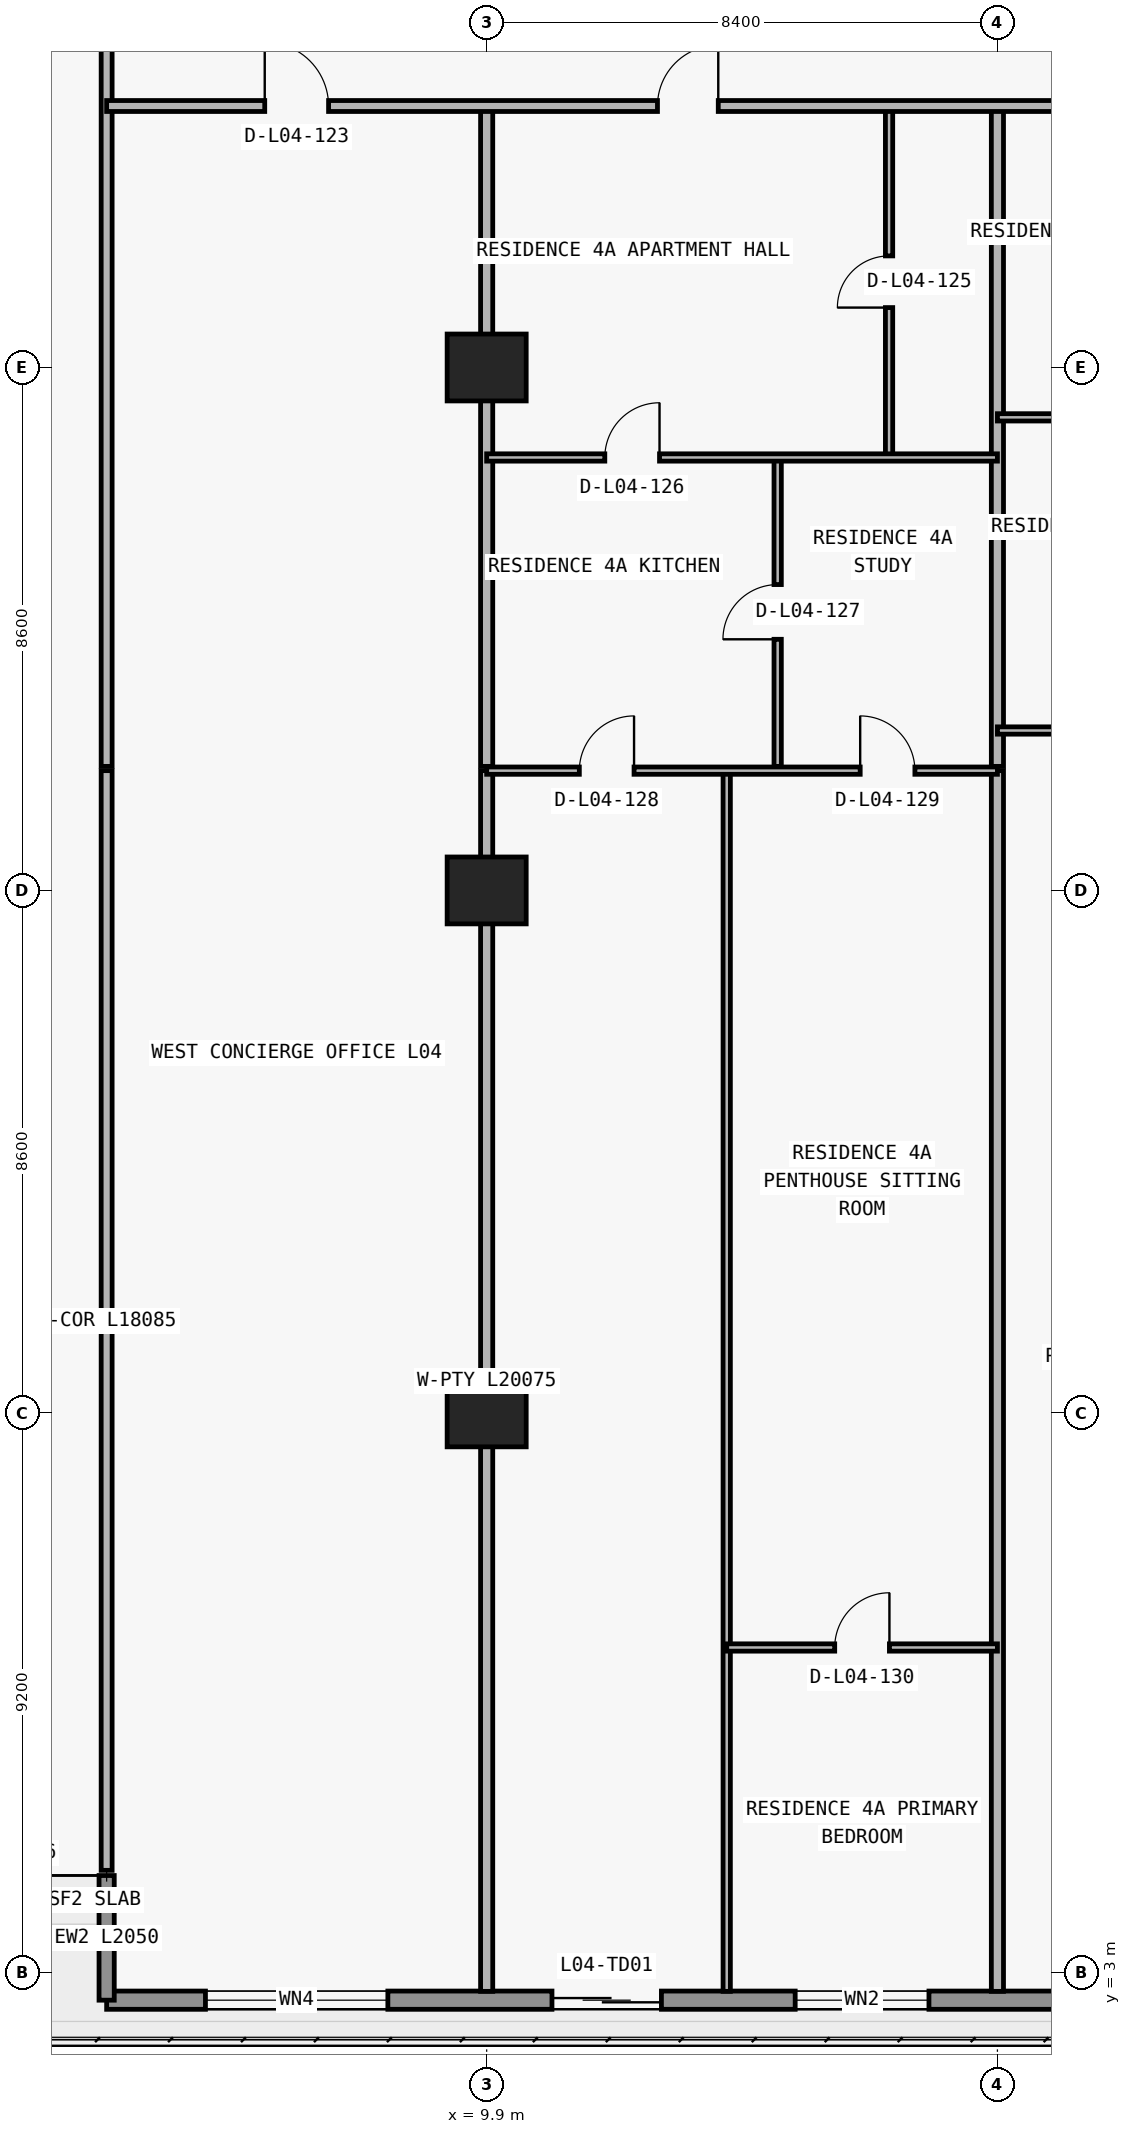
"""IFC4 building model, lengths in metres.
Left out: names, types, materials, properties, quantities, classifications, styles, units other than length and angle.
Written with IfcOpenShell. Run it as: python <this file> out.ifc"""

import sys

from ifc_helpers import new_model, si_unit, direction, frame, frame_2d, origin, origin_2d, place, context, subcontext, project, spatial, rectangle, extrude, element, fill, save


model = new_model("IFC4")
c1 = context("Model", 3, precision=1e-05, world=origin(), true_north=direction((0.0, 1.0)))
c2 = subcontext(c1, "Body", "Model", "MODEL_VIEW")
j1 = project(units=[si_unit("LENGTHUNIT", "METRE"), si_unit("PLANEANGLEUNIT", "RADIAN")], contexts=[c1])
p1 = place(None, origin())
s1 = spatial("IfcSite", under=j1, at=p1, CompositionType="ELEMENT")
p2 = place(p1, origin())
s2 = spatial("IfcBuilding", under=s1, at=p2, CompositionType="ELEMENT")
p3 = place(p2, frame((0.0, 0.0, 19.8)))
s3 = spatial("IfcBuildingStorey", under=s2, at=p3, CompositionType="ELEMENT", Elevation=19.8)
for number, where, z_axis, x_axis in (
    (1, (9.9, 12.2, 0.0), (0.0, 0.0, 1.0), (1.0, 0.0, 0.0)),
    (2, (9.9, 20.8, 0.0), (0.0, 0.0, 1.0), (1.0, 0.0, 0.0)),
    (3, (9.9, 29.4, 0.0), (0.0, 0.0, 1.0), (1.0, 0.0, 0.0)),
):
    element("IfcColumn", number, at=place(p3, frame(where, z_axis=z_axis, x_axis=x_axis)), inside=s3, PredefinedType="COLUMN", context=c2, shape_type="SweptSolid", body=[
        extrude(rectangle(XDim=1.3, YDim=1.1, at=origin_2d()), origin(), (0.0, 0.0, 1.0), 4.45),
    ])
p4 = place(p3, frame((74.15, 2.55, 0.0), z_axis=(0.0, 0.0, 1.0), x_axis=(-1.0, 0.0, 0.0)))
e4 = element("IfcWall", 4, at=p4, inside=s3, PredefinedType="STANDARD", context=c2, shape_type="SweptSolid", body=[
    extrude(rectangle(XDim=70.5, YDim=0.3, at=frame_2d((35.25, 0.0))), origin(), (0.0, 0.0, 1.0), 4.45),
])
p5 = place(p4, frame((65.875, 0.0, 0.85)))
e5 = element("IfcOpeningElement", 5, at=p5, cuts=e4, PredefinedType="OPENING", context=c2, shape_type="SweptSolid", body=[
    extrude(rectangle(XDim=3.0, YDim=2.4, at=frame_2d((1.5, 1.2))), frame((0.0, 0.16, 0.0), z_axis=(0.0, -1.0, 0.0), x_axis=(1.0, 0.0, 0.0)), (0.0, 0.0, 1.0), 0.32),
])
p6 = place(p4, frame((61.376, 0.0, 0.0)))
e6 = element("IfcOpeningElement", 6, at=p6, cuts=e4, PredefinedType="OPENING", context=c2, shape_type="SweptSolid", body=[
    extrude(rectangle(XDim=1.8, YDim=2.3, at=frame_2d((0.9, 1.15))), frame((0.0, 0.16, 0.0), z_axis=(0.0, -1.0, 0.0), x_axis=(1.0, 0.0, 0.0)), (0.0, 0.0, 1.0), 0.32),
])
p7 = place(p4, frame((56.976, 0.0, 0.85)))
e7 = element("IfcOpeningElement", 7, at=p7, cuts=e4, PredefinedType="OPENING", context=c2, shape_type="SweptSolid", body=[
    extrude(rectangle(XDim=2.2, YDim=1.55, at=frame_2d((1.1, 0.775))), frame((0.0, 0.16, 0.0), z_axis=(0.0, -1.0, 0.0), x_axis=(1.0, 0.0, 0.0)), (0.0, 0.0, 1.0), 0.32),
])
p8 = place(p4, frame((52.64, 0.0, 0.0)))
e8 = element("IfcOpeningElement", 8, at=p8, cuts=e4, PredefinedType="OPENING", context=c2, shape_type="SweptSolid", body=[
    extrude(rectangle(XDim=1.8, YDim=2.3, at=frame_2d((0.9, 1.15))), frame((0.0, 0.16, 0.0), z_axis=(0.0, -1.0, 0.0), x_axis=(1.0, 0.0, 0.0)), (0.0, 0.0, 1.0), 0.32),
])
p9 = place(p4, frame((48.24, 0.0, 0.85)))
e9 = element("IfcOpeningElement", 9, at=p9, cuts=e4, PredefinedType="OPENING", context=c2, shape_type="SweptSolid", body=[
    extrude(rectangle(XDim=2.2, YDim=1.55, at=frame_2d((1.1, 0.775))), frame((0.0, 0.16, 0.0), z_axis=(0.0, -1.0, 0.0), x_axis=(1.0, 0.0, 0.0)), (0.0, 0.0, 1.0), 0.32),
])
p10 = place(p4, frame((34.35, 0.0, 0.0)))
e10 = element("IfcOpeningElement", 10, at=p10, cuts=e4, PredefinedType="OPENING", context=c2, shape_type="SweptSolid", body=[
    extrude(rectangle(XDim=1.8, YDim=2.3, at=frame_2d((0.9, 1.15))), frame((0.0, 0.16, 0.0), z_axis=(0.0, -1.0, 0.0), x_axis=(1.0, 0.0, 0.0)), (0.0, 0.0, 1.0), 0.32),
])
p11 = place(p4, frame((17.95, 0.0, 0.0)))
e11 = element("IfcOpeningElement", 11, at=p11, cuts=e4, PredefinedType="OPENING", context=c2, shape_type="SweptSolid", body=[
    extrude(rectangle(XDim=1.8, YDim=2.3, at=frame_2d((0.9, 1.15))), frame((0.0, 0.16, 0.0), z_axis=(0.0, -1.0, 0.0), x_axis=(1.0, 0.0, 0.0)), (0.0, 0.0, 1.0), 0.32),
])
p12 = place(p4, frame((9.35, 0.0, 0.85)))
e12 = element("IfcOpeningElement", 12, at=p12, cuts=e4, PredefinedType="OPENING", context=c2, shape_type="SweptSolid", body=[
    extrude(rectangle(XDim=2.2, YDim=1.55, at=frame_2d((1.1, 0.775))), frame((0.0, 0.16, 0.0), z_axis=(0.0, -1.0, 0.0), x_axis=(1.0, 0.0, 0.0)), (0.0, 0.0, 1.0), 0.32),
])
p13 = place(p4, frame((1.625, 0.0, 0.85)))
e13 = element("IfcOpeningElement", 13, at=p13, cuts=e4, PredefinedType="OPENING", context=c2, shape_type="SweptSolid", body=[
    extrude(rectangle(XDim=3.0, YDim=2.4, at=frame_2d((1.5, 1.2))), frame((0.0, 0.16, 0.0), z_axis=(0.0, -1.0, 0.0), x_axis=(1.0, 0.0, 0.0)), (0.0, 0.0, 1.0), 0.32),
])
p14 = place(p3, frame((3.65, 4.6, 0.0), z_axis=(0.0, 0.0, 1.0), x_axis=(0.0, -1.0, 0.0)))
e14 = element("IfcWall", 14, at=p14, inside=s3, PredefinedType="ELEMENTEDWALL", context=c2, shape_type="SweptSolid", body=[
    extrude(rectangle(XDim=2.05, YDim=0.25, at=frame_2d((1.025, 0.0))), origin(), (0.0, 0.0, 1.0), 4.45),
])
p15 = place(p3, frame((3.65, 4.685, 0.0), z_axis=(0.0, 0.0, 1.0), x_axis=(0.0, 1.0, 0.0)))
e15 = element("IfcWall", 15, at=p15, inside=s3, PredefinedType="PARTITIONING", context=c2, shape_type="SweptSolid", body=[
    extrude(rectangle(XDim=18.085, YDim=0.18, at=frame_2d((9.042, 0.0))), origin(), (0.0, 0.0, 1.0), 4.45),
])
p16 = place(p3, frame((3.65, 22.84, 0.0), z_axis=(0.0, 0.0, 1.0), x_axis=(0.0, 1.0, 0.0)))
e16 = element("IfcWall", 16, at=p16, inside=s3, PredefinedType="PARTITIONING", context=c2, shape_type="SweptSolid", body=[
    extrude(rectangle(XDim=25.44, YDim=0.18, at=frame_2d((12.72, 0.0))), origin(), (0.0, 0.0, 1.0), 4.45),
])
p17 = place(p3, frame((9.9, 2.695, 0.0), z_axis=(0.0, 0.0, 1.0), x_axis=(0.0, 1.0, 0.0)))
e17 = element("IfcWall", 17, at=p17, inside=s3, PredefinedType="PARTITIONING", context=c2, shape_type="SweptSolid", body=[
    extrude(rectangle(XDim=20.075, YDim=0.2, at=frame_2d((10.038, 0.0))), origin(), (0.0, 0.0, 1.0), 3.014),
])
p18 = place(p3, frame((9.9, 22.84, 0.0), z_axis=(0.0, 0.0, 1.0), x_axis=(0.0, 1.0, 0.0)))
e18 = element("IfcWall", 18, at=p18, inside=s3, PredefinedType="PARTITIONING", context=c2, shape_type="SweptSolid", body=[
    extrude(rectangle(XDim=10.86, YDim=0.2, at=frame_2d((5.43, 0.0))), origin(), (0.0, 0.0, 1.0), 3.414),
])
p19 = place(p3, frame((13.848, 2.695, 0.0), z_axis=(0.0, 0.0, 1.0), x_axis=(0.0, 1.0, 0.0)))
e19 = element("IfcWall", 19, at=p19, inside=s3, PredefinedType="PARTITIONING", context=c2, shape_type="SweptSolid", body=[
    extrude(rectangle(XDim=20.075, YDim=0.12, at=frame_2d((10.038, 0.0))), origin(), (0.0, 0.0, 1.0), 4.05),
])
p20 = place(p3, frame((14.686, 22.84, 0.0), z_axis=(0.0, 0.0, 1.0), x_axis=(0.0, 1.0, 0.0)))
e20 = element("IfcWall", 20, at=p20, inside=s3, PredefinedType="PARTITIONING", context=c2, shape_type="SweptSolid", body=[
    extrude(rectangle(XDim=5.08, YDim=0.12, at=frame_2d((2.54, 0.0))), origin(), (0.0, 0.0, 1.0), 4.45),
])
p21 = place(p20, frame((2.09, 0.0, 0.0)))
e21 = element("IfcOpeningElement", 21, at=p21, cuts=e20, PredefinedType="OPENING", context=c2, shape_type="SweptSolid", body=[
    extrude(rectangle(XDim=0.9, YDim=2.15, at=frame_2d((0.45, 1.075))), frame((0.0, 0.07, 0.0), z_axis=(0.0, -1.0, 0.0), x_axis=(1.0, 0.0, 0.0)), (0.0, 0.0, 1.0), 0.14),
])
p22 = place(p3, frame((16.518, 27.92, 0.0), z_axis=(0.0, 0.0, 1.0), x_axis=(0.0, 1.0, 0.0)))
e22 = element("IfcWall", 22, at=p22, inside=s3, PredefinedType="PARTITIONING", context=c2, shape_type="SweptSolid", body=[
    extrude(rectangle(XDim=5.78, YDim=0.12, at=frame_2d((2.89, 0.0))), origin(), (0.0, 0.0, 1.0), 3.823),
])
p23 = place(p22, frame((2.465, 0.0, 0.0)))
e23 = element("IfcOpeningElement", 23, at=p23, cuts=e22, PredefinedType="OPENING", context=c2, shape_type="SweptSolid", body=[
    extrude(rectangle(XDim=0.85, YDim=2.1, at=frame_2d((0.425, 1.05))), frame((0.0, 0.07, 0.0), z_axis=(0.0, -1.0, 0.0), x_axis=(1.0, 0.0, 0.0)), (0.0, 0.0, 1.0), 0.14),
])
p24 = place(p3, frame((18.3, 2.695, 0.0), z_axis=(0.0, 0.0, 1.0), x_axis=(0.0, 1.0, 0.0)))
e24 = element("IfcWall", 24, at=p24, inside=s3, PredefinedType="PARTITIONING", context=c2, shape_type="SweptSolid", body=[
    extrude(rectangle(XDim=20.075, YDim=0.2, at=frame_2d((10.038, 0.0))), origin(), (0.0, 0.0, 1.0), 4.05),
])
p25 = place(p3, frame((18.3, 22.84, 0.0), z_axis=(0.0, 0.0, 1.0), x_axis=(0.0, 1.0, 0.0)))
e25 = element("IfcWall", 25, at=p25, inside=s3, PredefinedType="PARTITIONING", context=c2, shape_type="SweptSolid", body=[
    extrude(rectangle(XDim=10.86, YDim=0.2, at=frame_2d((5.43, 0.0))), origin(), (0.0, 0.0, 1.0), 4.45),
])
p26 = place(p3, frame((13.848, 8.35, 0.0), z_axis=(0.0, 0.0, 1.0), x_axis=(1.0, 0.0, 0.0)))
e26 = element("IfcWall", 26, at=p26, inside=s3, PredefinedType="PARTITIONING", context=c2, shape_type="SweptSolid", body=[
    extrude(rectangle(XDim=4.452, YDim=0.12, at=frame_2d((2.226, 0.0))), origin(), (0.0, 0.0, 1.0), 4.45),
])
p27 = place(p26, frame((1.776, 0.0, 0.0)))
e27 = element("IfcOpeningElement", 27, at=p27, cuts=e26, PredefinedType="OPENING", context=c2, shape_type="SweptSolid", body=[
    extrude(rectangle(XDim=0.9, YDim=2.15, at=frame_2d((0.45, 1.075))), frame((0.0, 0.07, 0.0), z_axis=(0.0, -1.0, 0.0), x_axis=(1.0, 0.0, 0.0)), (0.0, 0.0, 1.0), 0.14),
])
p28 = place(p3, frame((9.9, 22.77, 0.0), z_axis=(0.0, 0.0, 1.0), x_axis=(1.0, 0.0, 0.0)))
e28 = element("IfcWall", 28, at=p28, inside=s3, PredefinedType="PARTITIONING", context=c2, shape_type="SweptSolid", body=[
    extrude(rectangle(XDim=8.4, YDim=0.12, at=frame_2d((4.2, 0.0))), origin(), (0.0, 0.0, 1.0), 4.45),
])
p29 = place(p28, frame((1.524, 0.0, 0.0)))
e29 = element("IfcOpeningElement", 29, at=p29, cuts=e28, PredefinedType="OPENING", context=c2, shape_type="SweptSolid", body=[
    extrude(rectangle(XDim=0.9, YDim=2.15, at=frame_2d((0.45, 1.075))), frame((0.0, 0.07, 0.0), z_axis=(0.0, -1.0, 0.0), x_axis=(1.0, 0.0, 0.0)), (0.0, 0.0, 1.0), 0.14),
])
p30 = place(p28, frame((6.143, 0.0, 0.0)))
e30 = element("IfcOpeningElement", 30, at=p30, cuts=e28, PredefinedType="OPENING", context=c2, shape_type="SweptSolid", body=[
    extrude(rectangle(XDim=0.9, YDim=2.15, at=frame_2d((0.45, 1.075))), frame((0.0, 0.07, 0.0), z_axis=(0.0, -1.0, 0.0), x_axis=(1.0, 0.0, 0.0)), (0.0, 0.0, 1.0), 0.14),
])
p31 = place(p3, frame((18.3, 23.43, 0.0), z_axis=(0.0, 0.0, 1.0), x_axis=(1.0, 0.0, 0.0)))
e31 = element("IfcWall", 31, at=p31, inside=s3, PredefinedType="PARTITIONING", context=c2, shape_type="SweptSolid", body=[
    extrude(rectangle(XDim=8.35, YDim=0.12, at=frame_2d((4.175, 0.0))), origin(), (0.0, 0.0, 1.0), 4.45),
])
p32 = place(p31, frame((1.818, 0.0, 0.0)))
e32 = element("IfcOpeningElement", 32, at=p32, cuts=e31, PredefinedType="OPENING", context=c2, shape_type="SweptSolid", body=[
    extrude(rectangle(XDim=0.9, YDim=2.15, at=frame_2d((0.45, 1.075))), frame((0.0, 0.07, 0.0), z_axis=(0.0, -1.0, 0.0), x_axis=(1.0, 0.0, 0.0)), (0.0, 0.0, 1.0), 0.14),
])
p33 = place(p31, frame((6.035, 0.0, 0.0)))
e33 = element("IfcOpeningElement", 33, at=p33, cuts=e31, PredefinedType="OPENING", context=c2, shape_type="SweptSolid", body=[
    extrude(rectangle(XDim=0.9, YDim=2.15, at=frame_2d((0.45, 1.075))), frame((0.0, 0.07, 0.0), z_axis=(0.0, -1.0, 0.0), x_axis=(1.0, 0.0, 0.0)), (0.0, 0.0, 1.0), 0.14),
])
p34 = place(p3, frame((9.9, 27.92, 0.0), z_axis=(0.0, 0.0, 1.0), x_axis=(1.0, 0.0, 0.0)))
e34 = element("IfcWall", 34, at=p34, inside=s3, PredefinedType="PARTITIONING", context=c2, shape_type="SweptSolid", body=[
    extrude(rectangle(XDim=8.4, YDim=0.12, at=frame_2d((4.2, 0.0))), origin(), (0.0, 0.0, 1.0), 4.45),
])
p35 = place(p34, frame((1.943, 0.0, 0.0)))
e35 = element("IfcOpeningElement", 35, at=p35, cuts=e34, PredefinedType="OPENING", context=c2, shape_type="SweptSolid", body=[
    extrude(rectangle(XDim=0.9, YDim=2.15, at=frame_2d((0.45, 1.075))), frame((0.0, 0.07, 0.0), z_axis=(0.0, -1.0, 0.0), x_axis=(1.0, 0.0, 0.0)), (0.0, 0.0, 1.0), 0.14),
])
p36 = place(p3, frame((18.3, 28.58, 0.0), z_axis=(0.0, 0.0, 1.0), x_axis=(1.0, 0.0, 0.0)))
e36 = element("IfcWall", 36, at=p36, inside=s3, PredefinedType="PARTITIONING", context=c2, shape_type="SweptSolid", body=[
    extrude(rectangle(XDim=8.35, YDim=0.12, at=frame_2d((4.175, 0.0))), origin(), (0.0, 0.0, 1.0), 4.45),
])
p37 = place(p36, frame((1.818, 0.0, 0.0)))
e37 = element("IfcOpeningElement", 37, at=p37, cuts=e36, PredefinedType="OPENING", context=c2, shape_type="SweptSolid", body=[
    extrude(rectangle(XDim=0.9, YDim=2.15, at=frame_2d((0.45, 1.075))), frame((0.0, 0.07, 0.0), z_axis=(0.0, -1.0, 0.0), x_axis=(1.0, 0.0, 0.0)), (0.0, 0.0, 1.0), 0.14),
])
p38 = place(p3, frame((3.65, 33.7, 0.0), z_axis=(0.0, 0.0, 1.0), x_axis=(1.0, 0.0, 0.0)))
e38 = element("IfcWall", 38, at=p38, inside=s3, PredefinedType="PARTITIONING", context=c2, shape_type="SweptSolid", body=[
    extrude(rectangle(XDim=23.0, YDim=0.18, at=frame_2d((11.5, 0.0))), origin(), (0.0, 0.0, 1.0), 4.45),
])
p39 = place(p38, frame((2.6, 0.0, 0.0)))
e39 = element("IfcOpeningElement", 39, at=p39, cuts=e38, PredefinedType="OPENING", context=c2, shape_type="SweptSolid", body=[
    extrude(rectangle(XDim=1.05, YDim=2.15, at=frame_2d((0.525, 1.075))), frame((0.0, 0.1, 0.0), z_axis=(0.0, -1.0, 0.0), x_axis=(1.0, 0.0, 0.0)), (0.0, 0.0, 1.0), 0.2),
])
p40 = place(p38, frame((9.059, 0.0, 0.0)))
e40 = element("IfcOpeningElement", 40, at=p40, cuts=e38, PredefinedType="OPENING", context=c2, shape_type="SweptSolid", body=[
    extrude(rectangle(XDim=1.0, YDim=2.2, at=frame_2d((0.5, 1.1))), frame((0.0, 0.1, 0.0), z_axis=(0.0, -1.0, 0.0), x_axis=(1.0, 0.0, 0.0)), (0.0, 0.0, 1.0), 0.2),
])
p41 = place(p38, frame((17.344, 0.0, 0.0)))
e41 = element("IfcOpeningElement", 41, at=p41, cuts=e38, PredefinedType="OPENING", context=c2, shape_type="SweptSolid", body=[
    extrude(rectangle(XDim=1.0, YDim=2.2, at=frame_2d((0.5, 1.1))), frame((0.0, 0.1, 0.0), z_axis=(0.0, -1.0, 0.0), x_axis=(1.0, 0.0, 0.0)), (0.0, 0.0, 1.0), 0.2),
])
p42 = place(p5, origin())
e42 = element("IfcWindow", 42, at=p42, inside=s3, PartitioningType="SINGLE_PANEL", PredefinedType="WINDOW", context=c2, shape_type="SweptSolid", body=[
    extrude(rectangle(XDim=3.0, YDim=2.4, at=frame_2d((1.5, 1.2))), frame((0.0, 0.03, 0.0), z_axis=(0.0, -1.0, 0.0), x_axis=(1.0, 0.0, 0.0)), (0.0, 0.0, 1.0), 0.06),
])
fill(e5, e42)
p43 = place(p6, origin())
e43 = element("IfcDoor", 43, at=p43, inside=s3, OperationType="DOUBLE_DOOR_SLIDING", PredefinedType="DOOR", context=c2, shape_type="SweptSolid", body=[
    extrude(rectangle(XDim=1.8, YDim=2.3, at=frame_2d((0.9, 1.15))), frame((0.0, 0.025, 0.0), z_axis=(0.0, -1.0, 0.0), x_axis=(1.0, 0.0, 0.0)), (0.0, 0.0, 1.0), 0.05),
])
fill(e6, e43)
p44 = place(p7, origin())
e44 = element("IfcWindow", 44, at=p44, inside=s3, PartitioningType="SINGLE_PANEL", PredefinedType="WINDOW", context=c2, shape_type="SweptSolid", body=[
    extrude(rectangle(XDim=2.2, YDim=1.55, at=frame_2d((1.1, 0.775))), frame((0.0, 0.03, 0.0), z_axis=(0.0, -1.0, 0.0), x_axis=(1.0, 0.0, 0.0)), (0.0, 0.0, 1.0), 0.06),
])
fill(e7, e44)
p45 = place(p39, origin())
e45 = element("IfcDoor", 45, at=p45, inside=s3, OperationType="SINGLE_SWING_LEFT", PredefinedType="DOOR", context=c2, shape_type="SweptSolid", body=[
    extrude(rectangle(XDim=1.05, YDim=2.15, at=frame_2d((0.525, 1.075))), frame((0.0, 0.025, 0.0), z_axis=(0.0, -1.0, 0.0), x_axis=(1.0, 0.0, 0.0)), (0.0, 0.0, 1.0), 0.05),
])
fill(e39, e45)
p46 = place(p40, origin())
e46 = element("IfcDoor", 46, at=p46, inside=s3, OperationType="SINGLE_SWING_RIGHT", PredefinedType="DOOR", context=c2, shape_type="SweptSolid", body=[
    extrude(rectangle(XDim=1.0, YDim=2.2, at=frame_2d((0.5, 1.1))), frame((0.0, 0.025, 0.0), z_axis=(0.0, -1.0, 0.0), x_axis=(1.0, 0.0, 0.0)), (0.0, 0.0, 1.0), 0.05),
])
fill(e40, e46)
p47 = place(p23, origin())
e47 = element("IfcDoor", 47, at=p47, inside=s3, OperationType="SINGLE_SWING_LEFT", PredefinedType="DOOR", context=c2, shape_type="SweptSolid", body=[
    extrude(rectangle(XDim=0.85, YDim=2.1, at=frame_2d((0.425, 1.05))), frame((0.0, 0.025, 0.0), z_axis=(0.0, -1.0, 0.0), x_axis=(1.0, 0.0, 0.0)), (0.0, 0.0, 1.0), 0.05),
])
fill(e23, e47)
p48 = place(p35, origin())
e48 = element("IfcDoor", 48, at=p48, inside=s3, OperationType="SINGLE_SWING_RIGHT", PredefinedType="DOOR", context=c2, shape_type="SweptSolid", body=[
    extrude(rectangle(XDim=0.9, YDim=2.15, at=frame_2d((0.45, 1.075))), frame((0.0, 0.025, 0.0), z_axis=(0.0, -1.0, 0.0), x_axis=(1.0, 0.0, 0.0)), (0.0, 0.0, 1.0), 0.05),
])
fill(e35, e48)
p49 = place(p21, origin())
e49 = element("IfcDoor", 49, at=p49, inside=s3, OperationType="SINGLE_SWING_LEFT", PredefinedType="DOOR", context=c2, shape_type="SweptSolid", body=[
    extrude(rectangle(XDim=0.9, YDim=2.15, at=frame_2d((0.45, 1.075))), frame((0.0, 0.025, 0.0), z_axis=(0.0, -1.0, 0.0), x_axis=(1.0, 0.0, 0.0)), (0.0, 0.0, 1.0), 0.05),
])
fill(e21, e49)
p50 = place(p29, origin())
e50 = element("IfcDoor", 50, at=p50, inside=s3, OperationType="SINGLE_SWING_RIGHT", PredefinedType="DOOR", context=c2, shape_type="SweptSolid", body=[
    extrude(rectangle(XDim=0.9, YDim=2.15, at=frame_2d((0.45, 1.075))), frame((0.0, 0.025, 0.0), z_axis=(0.0, -1.0, 0.0), x_axis=(1.0, 0.0, 0.0)), (0.0, 0.0, 1.0), 0.05),
])
fill(e29, e50)
p51 = place(p30, origin())
e51 = element("IfcDoor", 51, at=p51, inside=s3, OperationType="SINGLE_SWING_LEFT", PredefinedType="DOOR", context=c2, shape_type="SweptSolid", body=[
    extrude(rectangle(XDim=0.9, YDim=2.15, at=frame_2d((0.45, 1.075))), frame((0.0, 0.025, 0.0), z_axis=(0.0, -1.0, 0.0), x_axis=(1.0, 0.0, 0.0)), (0.0, 0.0, 1.0), 0.05),
])
fill(e30, e51)
p52 = place(p27, origin())
e52 = element("IfcDoor", 52, at=p52, inside=s3, OperationType="SINGLE_SWING_RIGHT", PredefinedType="DOOR", context=c2, shape_type="SweptSolid", body=[
    extrude(rectangle(XDim=0.9, YDim=2.15, at=frame_2d((0.45, 1.075))), frame((0.0, 0.025, 0.0), z_axis=(0.0, -1.0, 0.0), x_axis=(1.0, 0.0, 0.0)), (0.0, 0.0, 1.0), 0.05),
])
fill(e27, e52)
save(model, sys.argv[1])
